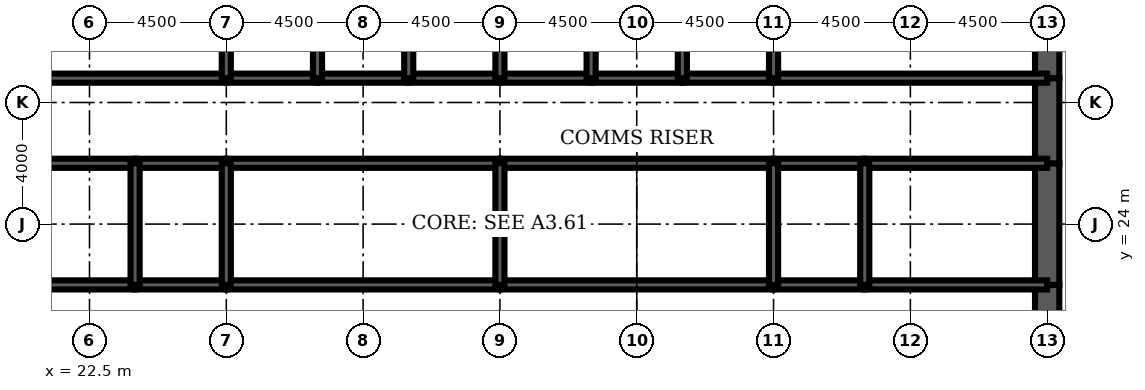
"""IFC4 building model, lengths in metres.
Left out: names, types, materials, properties, quantities, classifications, styles, units other than length and angle.
Written with IfcOpenShell. Run it as: python <this file> out.ifc"""

import sys

from ifc_helpers import new_model, si_unit, direction, frame, frame_2d, origin, place, context, subcontext, project, spatial, rectangle, extrude, element, fill, save


model = new_model("IFC4")
c1 = context("Model", 3, precision=1e-05, world=origin(), true_north=direction((0.0, 1.0)))
c2 = subcontext(c1, "Body", "Model", "MODEL_VIEW")
j1 = project(units=[si_unit("LENGTHUNIT", "METRE"), si_unit("PLANEANGLEUNIT", "RADIAN")], contexts=[c1])
p1 = place(None, origin())
s1 = spatial("IfcSite", under=j1, at=p1, CompositionType="ELEMENT")
p2 = place(p1, origin())
s2 = spatial("IfcBuilding", under=s1, at=p2, CompositionType="ELEMENT")
p3 = place(p2, frame((0.0, 0.0, 261.4)))
s3 = spatial("IfcBuildingStorey", under=s2, at=p3, CompositionType="ELEMENT", Elevation=261.4)
p4 = place(p3, frame((54.0, 19.2, 0.0), z_axis=(0.0, 0.0, 1.0), x_axis=(0.0, 1.0, 0.0)))
e1 = element("IfcWall", 1, at=p4, inside=s3, PredefinedType="SHEAR", context=c2, shape_type="SweptSolid", body=[
    extrude(rectangle(XDim=2.8, YDim=0.8, at=frame_2d((1.4, 0.0))), origin(), (0.0, 0.0, 1.0), 4.2),
])
p5 = place(p4, frame((0.4, 0.0, 0.0)))
e2 = element("IfcOpeningElement", 2, at=p5, cuts=e1, PredefinedType="OPENING", context=c2, shape_type="SweptSolid", body=[
    extrude(rectangle(XDim=1.8, YDim=2.1, at=frame_2d((0.9, 1.05))), frame((0.0, 0.41, 0.0), z_axis=(0.0, -1.0, 0.0), x_axis=(1.0, 0.0, 0.0)), (0.0, 0.0, 1.0), 0.82),
])
p6 = place(p3, frame((54.0, 22.0, 0.0), z_axis=(0.0, 0.0, 1.0), x_axis=(0.0, 1.0, 0.0)))
e3 = element("IfcWall", 3, at=p6, inside=s3, PredefinedType="SHEAR", context=c2, shape_type="SweptSolid", body=[
    extrude(rectangle(XDim=4.0, YDim=0.8, at=frame_2d((2.0, 0.0))), origin(), (0.0, 0.0, 1.0), 4.2),
])
p7 = place(p3, frame((54.0, 26.0, 0.0), z_axis=(0.0, 0.0, 1.0), x_axis=(0.0, 1.0, 0.0)))
e4 = element("IfcWall", 4, at=p7, inside=s3, PredefinedType="SHEAR", context=c2, shape_type="SweptSolid", body=[
    extrude(rectangle(XDim=2.8, YDim=0.8, at=frame_2d((1.4, 0.0))), origin(), (0.0, 0.0, 1.0), 4.2),
])
p8 = place(p7, frame((0.6, 0.0, 0.0)))
e5 = element("IfcOpeningElement", 5, at=p8, cuts=e4, PredefinedType="OPENING", context=c2, shape_type="SweptSolid", body=[
    extrude(rectangle(XDim=1.8, YDim=2.1, at=frame_2d((0.9, 1.05))), frame((0.0, 0.41, 0.0), z_axis=(0.0, -1.0, 0.0), x_axis=(1.0, 0.0, 0.0)), (0.0, 0.0, 1.0), 0.82),
])
p9 = place(p3, frame((54.0, 28.8, 0.0), z_axis=(0.0, 0.0, 1.0), x_axis=(0.0, 1.0, 0.0)))
e6 = element("IfcWall", 6, at=p9, inside=s3, PredefinedType="SHEAR", context=c2, shape_type="SweptSolid", body=[
    extrude(rectangle(XDim=3.2, YDim=0.8, at=frame_2d((1.6, 0.0))), origin(), (0.0, 0.0, 1.0), 4.2),
])
p10 = place(p3, frame((18.0, 28.8, 0.0), z_axis=(0.0, 0.0, 1.0), x_axis=(1.0, 0.0, 0.0)))
e7 = element("IfcWall", 7, at=p10, inside=s3, PredefinedType="SOLIDWALL", context=c2, shape_type="SweptSolid", body=[
    extrude(rectangle(XDim=9.0, YDim=0.3, at=frame_2d((4.5, 0.0))), origin(), (0.0, 0.0, 1.0), 4.2),
])
p11 = place(p10, frame((0.65, 0.0, 0.0)))
e8 = element("IfcOpeningElement", 8, at=p11, cuts=e7, PredefinedType="OPENING", context=c2, shape_type="SweptSolid", body=[
    extrude(rectangle(XDim=1.0, YDim=2.1, at=frame_2d((0.5, 1.05))), frame((0.0, 0.16, 0.0), z_axis=(0.0, -1.0, 0.0), x_axis=(1.0, 0.0, 0.0)), (0.0, 0.0, 1.0), 0.32),
])
p12 = place(p3, frame((27.0, 28.8, 0.0), z_axis=(0.0, 0.0, 1.0), x_axis=(1.0, 0.0, 0.0)))
e9 = element("IfcWall", 9, at=p12, inside=s3, PredefinedType="SOLIDWALL", context=c2, shape_type="SweptSolid", body=[
    extrude(rectangle(XDim=3.0, YDim=0.3, at=frame_2d((1.5, 0.0))), origin(), (0.0, 0.0, 1.0), 4.2),
])
p13 = place(p12, frame((0.95, 0.0, 0.0)))
e10 = element("IfcOpeningElement", 10, at=p13, cuts=e9, PredefinedType="OPENING", context=c2, shape_type="SweptSolid", body=[
    extrude(rectangle(XDim=1.1, YDim=2.2, at=frame_2d((0.55, 1.1))), frame((0.0, 0.16, 0.0), z_axis=(0.0, -1.0, 0.0), x_axis=(1.0, 0.0, 0.0)), (0.0, 0.0, 1.0), 0.32),
])
p14 = place(p3, frame((30.0, 28.8, 0.0), z_axis=(0.0, 0.0, 1.0), x_axis=(1.0, 0.0, 0.0)))
e11 = element("IfcWall", 11, at=p14, inside=s3, PredefinedType="SOLIDWALL", context=c2, shape_type="SweptSolid", body=[
    extrude(rectangle(XDim=3.0, YDim=0.3, at=frame_2d((1.5, 0.0))), origin(), (0.0, 0.0, 1.0), 4.2),
])
p15 = place(p14, frame((0.95, 0.0, 0.0)))
e12 = element("IfcOpeningElement", 12, at=p15, cuts=e11, PredefinedType="OPENING", context=c2, shape_type="SweptSolid", body=[
    extrude(rectangle(XDim=1.1, YDim=2.2, at=frame_2d((0.55, 1.1))), frame((0.0, 0.16, 0.0), z_axis=(0.0, -1.0, 0.0), x_axis=(1.0, 0.0, 0.0)), (0.0, 0.0, 1.0), 0.32),
])
p16 = place(p3, frame((33.0, 28.8, 0.0), z_axis=(0.0, 0.0, 1.0), x_axis=(1.0, 0.0, 0.0)))
e13 = element("IfcWall", 13, at=p16, inside=s3, PredefinedType="SOLIDWALL", context=c2, shape_type="SweptSolid", body=[
    extrude(rectangle(XDim=3.0, YDim=0.3, at=frame_2d((1.5, 0.0))), origin(), (0.0, 0.0, 1.0), 4.2),
])
p17 = place(p16, frame((0.95, 0.0, 0.0)))
e14 = element("IfcOpeningElement", 14, at=p17, cuts=e13, PredefinedType="OPENING", context=c2, shape_type="SweptSolid", body=[
    extrude(rectangle(XDim=1.1, YDim=2.2, at=frame_2d((0.55, 1.1))), frame((0.0, 0.16, 0.0), z_axis=(0.0, -1.0, 0.0), x_axis=(1.0, 0.0, 0.0)), (0.0, 0.0, 1.0), 0.32),
])
for number, where, z_axis, x_axis in (
    (15, (36.0, 28.8, 0.0), (0.0, 0.0, 1.0), (1.0, 0.0, 0.0)),
    (16, (39.0, 28.8, 0.0), (0.0, 0.0, 1.0), (1.0, 0.0, 0.0)),
):
    element("IfcWall", number, at=place(p3, frame(where, z_axis=z_axis, x_axis=x_axis)), inside=s3, PredefinedType="SOLIDWALL", context=c2, shape_type="SweptSolid", body=[
        extrude(rectangle(XDim=3.0, YDim=0.3, at=frame_2d((1.5, 0.0))), origin(), (0.0, 0.0, 1.0), 4.2),
    ])
p18 = place(p3, frame((42.0, 28.8, 0.0), z_axis=(0.0, 0.0, 1.0), x_axis=(1.0, 0.0, 0.0)))
e17 = element("IfcWall", 17, at=p18, inside=s3, PredefinedType="SOLIDWALL", context=c2, shape_type="SweptSolid", body=[
    extrude(rectangle(XDim=3.0, YDim=0.3, at=frame_2d((1.5, 0.0))), origin(), (0.0, 0.0, 1.0), 4.2),
])
p19 = place(p18, frame((0.95, 0.0, 0.0)))
e18 = element("IfcOpeningElement", 18, at=p19, cuts=e17, PredefinedType="OPENING", context=c2, shape_type="SweptSolid", body=[
    extrude(rectangle(XDim=1.1, YDim=2.2, at=frame_2d((0.55, 1.1))), frame((0.0, 0.16, 0.0), z_axis=(0.0, -1.0, 0.0), x_axis=(1.0, 0.0, 0.0)), (0.0, 0.0, 1.0), 0.32),
])
p20 = place(p3, frame((45.0, 28.8, 0.0), z_axis=(0.0, 0.0, 1.0), x_axis=(1.0, 0.0, 0.0)))
e19 = element("IfcWall", 19, at=p20, inside=s3, PredefinedType="SOLIDWALL", context=c2, shape_type="SweptSolid", body=[
    extrude(rectangle(XDim=9.0, YDim=0.3, at=frame_2d((4.5, 0.0))), origin(), (0.0, 0.0, 1.0), 4.2),
])
p21 = place(p20, frame((7.35, 0.0, 0.0)))
e20 = element("IfcOpeningElement", 20, at=p21, cuts=e19, PredefinedType="OPENING", context=c2, shape_type="SweptSolid", body=[
    extrude(rectangle(XDim=1.0, YDim=2.1, at=frame_2d((0.5, 1.05))), frame((0.0, 0.16, 0.0), z_axis=(0.0, -1.0, 0.0), x_axis=(1.0, 0.0, 0.0)), (0.0, 0.0, 1.0), 0.32),
])
p22 = place(p3, frame((18.0, 22.0, 0.0), z_axis=(0.0, 0.0, 1.0), x_axis=(1.0, 0.0, 0.0)))
e21 = element("IfcWall", 21, at=p22, inside=s3, PredefinedType="SOLIDWALL", context=c2, shape_type="SweptSolid", body=[
    extrude(rectangle(XDim=6.0, YDim=0.3, at=frame_2d((3.0, 0.0))), origin(), (0.0, 0.0, 1.0), 4.2),
])
p23 = place(p22, frame((4.4, 0.0, 0.0)))
e22 = element("IfcOpeningElement", 22, at=p23, cuts=e21, PredefinedType="OPENING", context=c2, shape_type="SweptSolid", body=[
    extrude(rectangle(XDim=1.0, YDim=2.1, at=frame_2d((0.5, 1.05))), frame((0.0, 0.16, 0.0), z_axis=(0.0, -1.0, 0.0), x_axis=(1.0, 0.0, 0.0)), (0.0, 0.0, 1.0), 0.32),
])
p24 = place(p22, frame((0.95, 0.0, 0.0)))
e23 = element("IfcOpeningElement", 23, at=p24, cuts=e21, PredefinedType="OPENING", context=c2, shape_type="SweptSolid", body=[
    extrude(rectangle(XDim=1.0, YDim=2.1, at=frame_2d((0.5, 1.05))), frame((0.0, 0.16, 0.0), z_axis=(0.0, -1.0, 0.0), x_axis=(1.0, 0.0, 0.0)), (0.0, 0.0, 1.0), 0.32),
])
p25 = place(p3, frame((24.0, 22.0, 0.0), z_axis=(0.0, 0.0, 1.0), x_axis=(1.0, 0.0, 0.0)))
e24 = element("IfcWall", 24, at=p25, inside=s3, PredefinedType="SOLIDWALL", context=c2, shape_type="SweptSolid", body=[
    extrude(rectangle(XDim=3.0, YDim=0.3, at=frame_2d((1.5, 0.0))), origin(), (0.0, 0.0, 1.0), 4.2),
])
p26 = place(p25, frame((1.0, 0.0, 0.0)))
e25 = element("IfcOpeningElement", 25, at=p26, cuts=e24, PredefinedType="OPENING", context=c2, shape_type="SweptSolid", body=[
    extrude(rectangle(XDim=1.0, YDim=2.1, at=frame_2d((0.5, 1.05))), frame((0.0, 0.16, 0.0), z_axis=(0.0, -1.0, 0.0), x_axis=(1.0, 0.0, 0.0)), (0.0, 0.0, 1.0), 0.32),
])
p27 = place(p3, frame((27.0, 22.0, 0.0), z_axis=(0.0, 0.0, 1.0), x_axis=(1.0, 0.0, 0.0)))
e26 = element("IfcWall", 26, at=p27, inside=s3, PredefinedType="SOLIDWALL", context=c2, shape_type="SweptSolid", body=[
    extrude(rectangle(XDim=9.0, YDim=0.3, at=frame_2d((4.5, 0.0))), origin(), (0.0, 0.0, 1.0), 4.2),
])
p28 = place(p27, frame((4.0, 0.0, 0.0)))
e27 = element("IfcOpeningElement", 27, at=p28, cuts=e26, PredefinedType="OPENING", context=c2, shape_type="SweptSolid", body=[
    extrude(rectangle(XDim=1.0, YDim=2.1, at=frame_2d((0.5, 1.05))), frame((0.0, 0.16, 0.0), z_axis=(0.0, -1.0, 0.0), x_axis=(1.0, 0.0, 0.0)), (0.0, 0.0, 1.0), 0.32),
])
p29 = place(p3, frame((36.0, 22.0, 0.0), z_axis=(0.0, 0.0, 1.0), x_axis=(1.0, 0.0, 0.0)))
e28 = element("IfcWall", 28, at=p29, inside=s3, PredefinedType="SOLIDWALL", context=c2, shape_type="SweptSolid", body=[
    extrude(rectangle(XDim=9.0, YDim=0.3, at=frame_2d((4.5, 0.0))), origin(), (0.0, 0.0, 1.0), 4.2),
])
p30 = place(p29, frame((4.0, 0.0, 0.0)))
e29 = element("IfcOpeningElement", 29, at=p30, cuts=e28, PredefinedType="OPENING", context=c2, shape_type="SweptSolid", body=[
    extrude(rectangle(XDim=1.0, YDim=2.1, at=frame_2d((0.5, 1.05))), frame((0.0, 0.16, 0.0), z_axis=(0.0, -1.0, 0.0), x_axis=(1.0, 0.0, 0.0)), (0.0, 0.0, 1.0), 0.32),
])
p31 = place(p3, frame((45.0, 22.0, 0.0), z_axis=(0.0, 0.0, 1.0), x_axis=(1.0, 0.0, 0.0)))
e30 = element("IfcWall", 30, at=p31, inside=s3, PredefinedType="SOLIDWALL", context=c2, shape_type="SweptSolid", body=[
    extrude(rectangle(XDim=3.0, YDim=0.3, at=frame_2d((1.5, 0.0))), origin(), (0.0, 0.0, 1.0), 4.2),
])
p32 = place(p31, frame((1.0, 0.0, 0.0)))
e31 = element("IfcOpeningElement", 31, at=p32, cuts=e30, PredefinedType="OPENING", context=c2, shape_type="SweptSolid", body=[
    extrude(rectangle(XDim=1.0, YDim=2.1, at=frame_2d((0.5, 1.05))), frame((0.0, 0.16, 0.0), z_axis=(0.0, -1.0, 0.0), x_axis=(1.0, 0.0, 0.0)), (0.0, 0.0, 1.0), 0.32),
])
p33 = place(p3, frame((48.0, 22.0, 0.0), z_axis=(0.0, 0.0, 1.0), x_axis=(1.0, 0.0, 0.0)))
e32 = element("IfcWall", 32, at=p33, inside=s3, PredefinedType="SOLIDWALL", context=c2, shape_type="SweptSolid", body=[
    extrude(rectangle(XDim=6.0, YDim=0.3, at=frame_2d((3.0, 0.0))), origin(), (0.0, 0.0, 1.0), 4.2),
])
p34 = place(p33, frame((2.0, 0.0, 0.0)))
e33 = element("IfcOpeningElement", 33, at=p34, cuts=e32, PredefinedType="OPENING", context=c2, shape_type="SweptSolid", body=[
    extrude(rectangle(XDim=1.0, YDim=2.1, at=frame_2d((0.5, 1.05))), frame((0.0, 0.16, 0.0), z_axis=(0.0, -1.0, 0.0), x_axis=(1.0, 0.0, 0.0)), (0.0, 0.0, 1.0), 0.32),
])
p35 = place(p33, frame((4.05, 0.0, 0.0)))
e34 = element("IfcOpeningElement", 34, at=p35, cuts=e32, PredefinedType="OPENING", context=c2, shape_type="SweptSolid", body=[
    extrude(rectangle(XDim=1.0, YDim=2.1, at=frame_2d((0.5, 1.05))), frame((0.0, 0.16, 0.0), z_axis=(0.0, -1.0, 0.0), x_axis=(1.0, 0.0, 0.0)), (0.0, 0.0, 1.0), 0.32),
])
p36 = place(p3, frame((18.0, 26.0, 0.0), z_axis=(0.0, 0.0, 1.0), x_axis=(1.0, 0.0, 0.0)))
e35 = element("IfcWall", 35, at=p36, inside=s3, PredefinedType="SOLIDWALL", context=c2, shape_type="SweptSolid", body=[
    extrude(rectangle(XDim=6.0, YDim=0.3, at=frame_2d((3.0, 0.0))), origin(), (0.0, 0.0, 1.0), 4.2),
])
p37 = place(p3, frame((24.0, 26.0, 0.0), z_axis=(0.0, 0.0, 1.0), x_axis=(1.0, 0.0, 0.0)))
e36 = element("IfcWall", 36, at=p37, inside=s3, PredefinedType="SOLIDWALL", context=c2, shape_type="SweptSolid", body=[
    extrude(rectangle(XDim=3.0, YDim=0.3, at=frame_2d((1.5, 0.0))), origin(), (0.0, 0.0, 1.0), 4.2),
])
for number, where, z_axis, x_axis in (
    (37, (27.0, 26.0, 0.0), (0.0, 0.0, 1.0), (1.0, 0.0, 0.0)),
    (38, (36.0, 26.0, 0.0), (0.0, 0.0, 1.0), (1.0, 0.0, 0.0)),
):
    element("IfcWall", number, at=place(p3, frame(where, z_axis=z_axis, x_axis=x_axis)), inside=s3, PredefinedType="SOLIDWALL", context=c2, shape_type="SweptSolid", body=[
        extrude(rectangle(XDim=9.0, YDim=0.3, at=frame_2d((4.5, 0.0))), origin(), (0.0, 0.0, 1.0), 4.2),
    ])
p38 = place(p3, frame((45.0, 26.0, 0.0), z_axis=(0.0, 0.0, 1.0), x_axis=(1.0, 0.0, 0.0)))
e39 = element("IfcWall", 39, at=p38, inside=s3, PredefinedType="SOLIDWALL", context=c2, shape_type="SweptSolid", body=[
    extrude(rectangle(XDim=3.0, YDim=0.3, at=frame_2d((1.5, 0.0))), origin(), (0.0, 0.0, 1.0), 4.2),
])
p39 = place(p3, frame((48.0, 26.0, 0.0), z_axis=(0.0, 0.0, 1.0), x_axis=(1.0, 0.0, 0.0)))
e40 = element("IfcWall", 40, at=p39, inside=s3, PredefinedType="SOLIDWALL", context=c2, shape_type="SweptSolid", body=[
    extrude(rectangle(XDim=6.0, YDim=0.3, at=frame_2d((3.0, 0.0))), origin(), (0.0, 0.0, 1.0), 4.2),
])
for number, where, z_axis, x_axis in (
    (41, (27.0, 28.8, 0.0), (0.0, 0.0, 1.0), (0.0, 1.0, 0.0)),
    (42, (30.0, 28.8, 0.0), (0.0, 0.0, 1.0), (0.0, 1.0, 0.0)),
    (43, (33.0, 28.8, 0.0), (0.0, 0.0, 1.0), (0.0, 1.0, 0.0)),
    (44, (36.0, 28.8, 0.0), (0.0, 0.0, 1.0), (0.0, 1.0, 0.0)),
    (45, (39.0, 28.8, 0.0), (0.0, 0.0, 1.0), (0.0, 1.0, 0.0)),
    (46, (42.0, 28.8, 0.0), (0.0, 0.0, 1.0), (0.0, 1.0, 0.0)),
    (47, (45.0, 28.8, 0.0), (0.0, 0.0, 1.0), (0.0, 1.0, 0.0)),
):
    element("IfcWall", number, at=place(p3, frame(where, z_axis=z_axis, x_axis=x_axis)), inside=s3, PredefinedType="SOLIDWALL", context=c2, shape_type="SweptSolid", body=[
        extrude(rectangle(XDim=3.2, YDim=0.3, at=frame_2d((1.6, 0.0))), origin(), (0.0, 0.0, 1.0), 4.2),
    ])
for number, where, z_axis, x_axis in (
    (48, (24.0, 22.0, 0.0), (0.0, 0.0, 1.0), (0.0, 1.0, 0.0)),
    (49, (27.0, 22.0, 0.0), (0.0, 0.0, 1.0), (0.0, 1.0, 0.0)),
    (50, (36.0, 22.0, 0.0), (0.0, 0.0, 1.0), (0.0, 1.0, 0.0)),
    (51, (45.0, 22.0, 0.0), (0.0, 0.0, 1.0), (0.0, 1.0, 0.0)),
    (52, (48.0, 22.0, 0.0), (0.0, 0.0, 1.0), (0.0, 1.0, 0.0)),
):
    element("IfcWall", number, at=place(p3, frame(where, z_axis=z_axis, x_axis=x_axis)), inside=s3, PredefinedType="SOLIDWALL", context=c2, shape_type="SweptSolid", body=[
        extrude(rectangle(XDim=4.0, YDim=0.3, at=frame_2d((2.0, 0.0))), origin(), (0.0, 0.0, 1.0), 4.2),
    ])
p40 = place(p3, frame((51.425, 22.15, 0.0), z_axis=(0.0, 0.0, 1.0), x_axis=(0.0, 1.0, 0.0)))
e53 = element("IfcWall", 53, at=p40, inside=s3, PredefinedType="PARTITIONING", context=c2, shape_type="SweptSolid", body=[
    extrude(rectangle(XDim=3.7, YDim=0.15, at=frame_2d((1.85, 0.0))), origin(), (0.0, 0.0, 1.0), 3.0),
])
p41 = place(p3, frame((22.2, 26.15, 0.0), z_axis=(0.0, 0.0, 1.0), x_axis=(0.0, 1.0, 0.0)))
e54 = element("IfcWall", 54, at=p41, inside=s3, PredefinedType="PARTITIONING", context=c2, shape_type="SweptSolid", body=[
    extrude(rectangle(XDim=2.5, YDim=0.15, at=frame_2d((1.25, 0.0))), origin(), (0.0, 0.0, 1.0), 3.0),
])
p42 = place(p41, frame((0.35, 0.0, 0.0)))
e55 = element("IfcOpeningElement", 55, at=p42, cuts=e54, PredefinedType="OPENING", context=c2, shape_type="SweptSolid", body=[
    extrude(rectangle(XDim=1.0, YDim=2.1, at=frame_2d((0.5, 1.05))), frame((0.0, 0.085, 0.0), z_axis=(0.0, -1.0, 0.0), x_axis=(1.0, 0.0, 0.0)), (0.0, 0.0, 1.0), 0.17),
])
p43 = place(p42, origin())
e56 = element("IfcDoor", 56, at=p43, inside=s3, OperationType="SINGLE_SWING_LEFT", PredefinedType="DOOR", context=c2, shape_type="SweptSolid", body=[
    extrude(rectangle(XDim=1.0, YDim=2.1, at=frame_2d((0.5, 1.05))), frame((0.0, 0.025, 0.0), z_axis=(0.0, -1.0, 0.0), x_axis=(1.0, 0.0, 0.0)), (0.0, 0.0, 1.0), 0.05),
])
fill(e55, e56)
p44 = place(p19, origin())
e57 = element("IfcDoor", 57, at=p44, inside=s3, OperationType="DOUBLE_DOOR_SLIDING", PredefinedType="USERDEFINED", context=c2, shape_type="SweptSolid", body=[
    extrude(rectangle(XDim=1.1, YDim=2.2, at=frame_2d((0.55, 1.1))), frame((0.0, 0.025, 0.0), z_axis=(0.0, -1.0, 0.0), x_axis=(1.0, 0.0, 0.0)), (0.0, 0.0, 1.0), 0.05),
])
fill(e18, e57)
p45 = place(p13, origin())
e58 = element("IfcDoor", 58, at=p45, inside=s3, OperationType="DOUBLE_DOOR_SLIDING", PredefinedType="USERDEFINED", context=c2, shape_type="SweptSolid", body=[
    extrude(rectangle(XDim=1.1, YDim=2.2, at=frame_2d((0.55, 1.1))), frame((0.0, 0.025, 0.0), z_axis=(0.0, -1.0, 0.0), x_axis=(1.0, 0.0, 0.0)), (0.0, 0.0, 1.0), 0.05),
])
fill(e10, e58)
p46 = place(p15, origin())
e59 = element("IfcDoor", 59, at=p46, inside=s3, OperationType="DOUBLE_DOOR_SLIDING", PredefinedType="USERDEFINED", context=c2, shape_type="SweptSolid", body=[
    extrude(rectangle(XDim=1.1, YDim=2.2, at=frame_2d((0.55, 1.1))), frame((0.0, 0.025, 0.0), z_axis=(0.0, -1.0, 0.0), x_axis=(1.0, 0.0, 0.0)), (0.0, 0.0, 1.0), 0.05),
])
fill(e12, e59)
p47 = place(p17, origin())
e60 = element("IfcDoor", 60, at=p47, inside=s3, OperationType="DOUBLE_DOOR_SLIDING", PredefinedType="USERDEFINED", context=c2, shape_type="SweptSolid", body=[
    extrude(rectangle(XDim=1.1, YDim=2.2, at=frame_2d((0.55, 1.1))), frame((0.0, 0.025, 0.0), z_axis=(0.0, -1.0, 0.0), x_axis=(1.0, 0.0, 0.0)), (0.0, 0.0, 1.0), 0.05),
])
fill(e14, e60)
p48 = place(p21, origin())
e61 = element("IfcDoor", 61, at=p48, inside=s3, OperationType="SINGLE_SWING_RIGHT", PredefinedType="DOOR", context=c2, shape_type="SweptSolid", body=[
    extrude(rectangle(XDim=1.0, YDim=2.1, at=frame_2d((0.5, 1.05))), frame((0.0, 0.025, 0.0), z_axis=(0.0, -1.0, 0.0), x_axis=(1.0, 0.0, 0.0)), (0.0, 0.0, 1.0), 0.05),
])
fill(e20, e61)
p49 = place(p5, origin())
e62 = element("IfcDoor", 62, at=p49, inside=s3, OperationType="SINGLE_SWING_LEFT", PredefinedType="DOOR", context=c2, shape_type="SweptSolid", body=[
    extrude(rectangle(XDim=1.8, YDim=2.1, at=frame_2d((0.9, 1.05))), frame((0.0, 0.4, 0.0), z_axis=(0.0, -1.0, 0.0), x_axis=(1.0, 0.0, 0.0)), (0.0, 0.0, 1.0), 0.8),
])
fill(e2, e62)
p50 = place(p8, origin())
e63 = element("IfcDoor", 63, at=p50, inside=s3, OperationType="SINGLE_SWING_LEFT", PredefinedType="DOOR", context=c2, shape_type="SweptSolid", body=[
    extrude(rectangle(XDim=1.8, YDim=2.1, at=frame_2d((0.9, 1.05))), frame((0.0, 0.4, 0.0), z_axis=(0.0, -1.0, 0.0), x_axis=(1.0, 0.0, 0.0)), (0.0, 0.0, 1.0), 0.8),
])
fill(e5, e63)
p51 = place(p23, origin())
e64 = element("IfcDoor", 64, at=p51, inside=s3, OperationType="SINGLE_SWING_RIGHT", PredefinedType="DOOR", context=c2, shape_type="SweptSolid", body=[
    extrude(rectangle(XDim=1.0, YDim=2.1, at=frame_2d((0.5, 1.05))), frame((0.0, 0.025, 0.0), z_axis=(0.0, -1.0, 0.0), x_axis=(1.0, 0.0, 0.0)), (0.0, 0.0, 1.0), 0.05),
])
fill(e22, e64)
p52 = place(p26, origin())
e65 = element("IfcDoor", 65, at=p52, inside=s3, OperationType="SINGLE_SWING_LEFT", PredefinedType="DOOR", context=c2, shape_type="SweptSolid", body=[
    extrude(rectangle(XDim=1.0, YDim=2.1, at=frame_2d((0.5, 1.05))), frame((0.0, 0.025, 0.0), z_axis=(0.0, -1.0, 0.0), x_axis=(1.0, 0.0, 0.0)), (0.0, 0.0, 1.0), 0.05),
])
fill(e25, e65)
p53 = place(p28, origin())
e66 = element("IfcDoor", 66, at=p53, inside=s3, OperationType="SINGLE_SWING_LEFT", PredefinedType="DOOR", context=c2, shape_type="SweptSolid", body=[
    extrude(rectangle(XDim=1.0, YDim=2.1, at=frame_2d((0.5, 1.05))), frame((0.0, 0.025, 0.0), z_axis=(0.0, -1.0, 0.0), x_axis=(1.0, 0.0, 0.0)), (0.0, 0.0, 1.0), 0.05),
])
fill(e27, e66)
p54 = place(p30, origin())
e67 = element("IfcDoor", 67, at=p54, inside=s3, OperationType="SINGLE_SWING_LEFT", PredefinedType="DOOR", context=c2, shape_type="SweptSolid", body=[
    extrude(rectangle(XDim=1.0, YDim=2.1, at=frame_2d((0.5, 1.05))), frame((0.0, 0.025, 0.0), z_axis=(0.0, -1.0, 0.0), x_axis=(1.0, 0.0, 0.0)), (0.0, 0.0, 1.0), 0.05),
])
fill(e29, e67)
p55 = place(p32, origin())
e68 = element("IfcDoor", 68, at=p55, inside=s3, OperationType="SINGLE_SWING_LEFT", PredefinedType="DOOR", context=c2, shape_type="SweptSolid", body=[
    extrude(rectangle(XDim=1.0, YDim=2.1, at=frame_2d((0.5, 1.05))), frame((0.0, 0.025, 0.0), z_axis=(0.0, -1.0, 0.0), x_axis=(1.0, 0.0, 0.0)), (0.0, 0.0, 1.0), 0.05),
])
fill(e31, e68)
p56 = place(p34, origin())
e69 = element("IfcDoor", 69, at=p56, inside=s3, OperationType="SINGLE_SWING_LEFT", PredefinedType="DOOR", context=c2, shape_type="SweptSolid", body=[
    extrude(rectangle(XDim=1.0, YDim=2.1, at=frame_2d((0.5, 1.05))), frame((0.0, 0.025, 0.0), z_axis=(0.0, -1.0, 0.0), x_axis=(1.0, 0.0, 0.0)), (0.0, 0.0, 1.0), 0.05),
])
fill(e33, e69)
p57 = place(p35, origin())
e70 = element("IfcDoor", 70, at=p57, inside=s3, OperationType="SINGLE_SWING_RIGHT", PredefinedType="DOOR", context=c2, shape_type="SweptSolid", body=[
    extrude(rectangle(XDim=1.0, YDim=2.1, at=frame_2d((0.5, 1.05))), frame((0.0, 0.025, 0.0), z_axis=(0.0, -1.0, 0.0), x_axis=(1.0, 0.0, 0.0)), (0.0, 0.0, 1.0), 0.05),
])
fill(e34, e70)
save(model, sys.argv[1])
